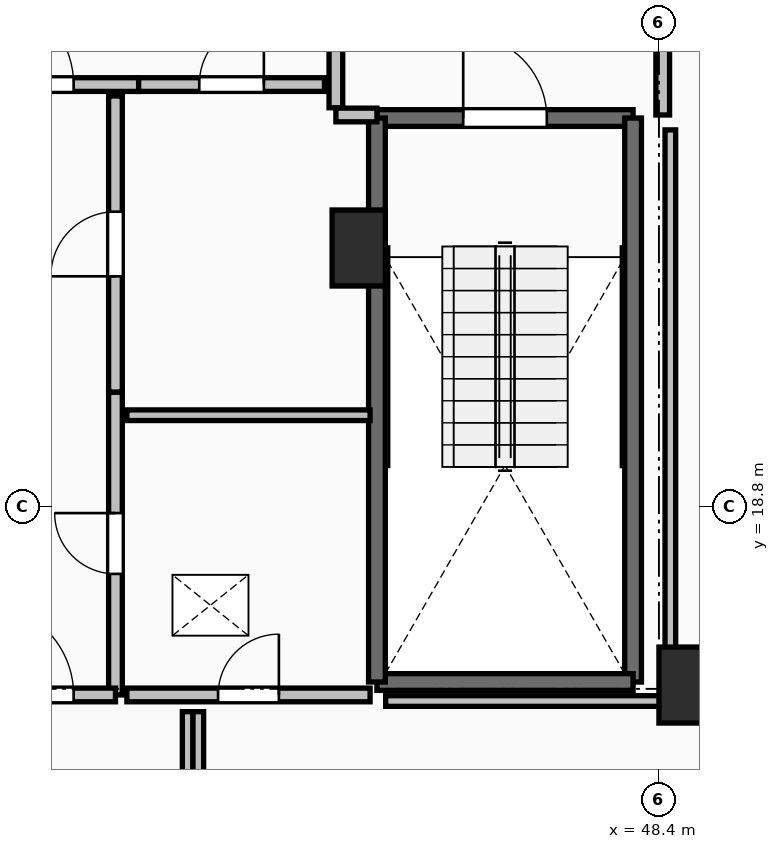
"""IFC4 building model, lengths in metres.
Left out: names, types, materials, properties, quantities, classifications, styles, units other than length and angle.
Written with IfcOpenShell. Run it as: python <this file> out.ifc"""

import sys

from ifc_helpers import new_model, si_unit, direction, frame, frame_2d, origin, origin_2d, place, context, subcontext, project, spatial, rectangle, extrude, element, fill, save


model = new_model("IFC4")
c1 = context("Model", 3, precision=1e-05, world=origin(), true_north=direction((0.0, 1.0)))
c2 = subcontext(c1, "Body", "Model", "MODEL_VIEW")
j1 = project(units=[si_unit("LENGTHUNIT", "METRE"), si_unit("PLANEANGLEUNIT", "RADIAN")], contexts=[c1])
p1 = place(None, origin())
s1 = spatial("IfcSite", under=j1, at=p1, CompositionType="ELEMENT")
p2 = place(p1, origin())
s2 = spatial("IfcBuilding", under=s1, at=p2, CompositionType="ELEMENT")
p3 = place(p2, frame((0.0, 0.0, 207.2)))
s3 = spatial("IfcBuildingStorey", under=s2, at=p3, CompositionType="ELEMENT", Elevation=207.2)
for number, where, z_axis, x_axis in (
    (1, (48.75, 16.45, 0.0), (0.0, 0.0, 1.0), (1.0, 0.0, 0.0)),
    (2, (44.45, 22.2, 0.0), (0.0, 0.0, 1.0), (1.0, 0.0, 0.0)),
):
    element("IfcColumn", number, at=place(p3, frame(where, z_axis=z_axis, x_axis=x_axis)), inside=s3, PredefinedType="PILASTER", context=c2, shape_type="SweptSolid", body=[
        extrude(rectangle(XDim=0.7, YDim=1.0, at=origin_2d()), origin(), (0.0, 0.0, 1.0), 3.55),
    ])
p4 = place(p3, frame((44.69, 23.91, 0.0), z_axis=(0.0, 0.0, 1.0), x_axis=(1.0, 0.0, 0.0)))
e3 = element("IfcWall", 3, at=p4, inside=s3, PredefinedType="SOLIDWALL", context=c2, shape_type="SweptSolid", body=[
    extrude(rectangle(XDim=3.37, YDim=0.22, at=frame_2d((1.685, 0.0))), origin(), (0.0, 0.0, 1.0), 3.29),
])
p5 = place(p4, frame((1.135, 0.0, 0.0)))
e4 = element("IfcOpeningElement", 4, at=p5, cuts=e3, PredefinedType="OPENING", context=c2, shape_type="SweptSolid", body=[
    extrude(rectangle(XDim=1.1, YDim=2.15, at=frame_2d((0.55, 1.075))), frame((0.0, 0.125, 0.0), z_axis=(0.0, -1.0, 0.0), x_axis=(1.0, 0.0, 0.0)), (0.0, 0.0, 1.0), 0.25),
])
p6 = place(p3, frame((48.06, 23.91, 0.0), z_axis=(0.0, 0.0, 1.0), x_axis=(0.0, -1.0, 0.0)))
e5 = element("IfcWall", 5, at=p6, inside=s3, PredefinedType="SOLIDWALL", context=c2, shape_type="SweptSolid", body=[
    extrude(rectangle(XDim=7.42, YDim=0.22, at=frame_2d((3.71, 0.0))), origin(), (0.0, 0.0, 1.0), 3.29),
])
p7 = place(p3, frame((48.06, 16.49, 0.0), z_axis=(0.0, 0.0, 1.0), x_axis=(-1.0, 0.0, 0.0)))
e6 = element("IfcWall", 6, at=p7, inside=s3, PredefinedType="SOLIDWALL", context=c2, shape_type="SweptSolid", body=[
    extrude(rectangle(XDim=3.37, YDim=0.22, at=frame_2d((1.685, 0.0))), origin(), (0.0, 0.0, 1.0), 3.29),
])
p8 = place(p3, frame((44.69, 16.49, 0.0), z_axis=(0.0, 0.0, 1.0), x_axis=(0.0, 1.0, 0.0)))
e7 = element("IfcWall", 7, at=p8, inside=s3, PredefinedType="SOLIDWALL", context=c2, shape_type="SweptSolid", body=[
    extrude(rectangle(XDim=7.42, YDim=0.22, at=frame_2d((3.71, 0.0))), origin(), (0.0, 0.0, 1.0), 3.29),
])
p9 = place(p3, frame((44.15, 27.955, 0.0), z_axis=(0.0, 0.0, 1.0), x_axis=(0.0, -1.0, 0.0)))
e8 = element("IfcWall", 8, at=p9, inside=s3, PredefinedType="PARTITIONING", context=c2, shape_type="SweptSolid", body=[
    extrude(rectangle(XDim=3.91, YDim=0.18, at=frame_2d((1.955, 0.0))), origin(), (0.0, 0.0, 1.0), 3.29),
])
p10 = place(p9, frame((1.355, 0.0, 0.0)))
e9 = element("IfcOpeningElement", 9, at=p10, cuts=e8, PredefinedType="OPENING", context=c2, shape_type="SweptSolid", body=[
    extrude(rectangle(XDim=1.2, YDim=2.15, at=frame_2d((0.6, 1.075))), frame((0.0, 0.105, 0.0), z_axis=(0.0, -1.0, 0.0), x_axis=(1.0, 0.0, 0.0)), (0.0, 0.0, 1.0), 0.21),
])
p11 = place(p3, frame((44.15, 23.95, 0.0), z_axis=(0.0, 0.0, 1.0), x_axis=(1.0, 0.0, 0.0)))
e10 = element("IfcWall", 10, at=p11, inside=s3, PredefinedType="PARTITIONING", context=c2, shape_type="SweptSolid", body=[
    extrude(rectangle(XDim=0.54, YDim=0.18, at=frame_2d((0.27, 0.0))), origin(), (0.0, 0.0, 1.0), 3.29),
])
p12 = place(p3, frame((48.45, 23.95, 0.0), z_axis=(0.0, 0.0, 1.0), x_axis=(0.0, 1.0, 0.0)))
e11 = element("IfcWall", 11, at=p12, inside=s3, PredefinedType="PARTITIONING", context=c2, shape_type="SweptSolid", body=[
    extrude(rectangle(XDim=4.05, YDim=0.18, at=frame_2d((2.025, 0.0))), origin(), (0.0, 0.0, 1.0), 3.29),
])
p13 = place(p12, frame((1.425, 0.0, 0.0)))
e12 = element("IfcOpeningElement", 12, at=p13, cuts=e11, PredefinedType="OPENING", context=c2, shape_type="SweptSolid", body=[
    extrude(rectangle(XDim=1.2, YDim=2.15, at=frame_2d((0.6, 1.075))), frame((0.0, 0.105, 0.0), z_axis=(0.0, -1.0, 0.0), x_axis=(1.0, 0.0, 0.0)), (0.0, 0.0, 1.0), 0.21),
])
p14 = place(p3, frame((38.645, 24.35, 0.0), z_axis=(0.0, 0.0, 1.0), x_axis=(1.0, 0.0, 0.0)))
e13 = element("IfcWall", 13, at=p14, inside=s3, PredefinedType="PARTITIONING", context=c2, shape_type="SweptSolid", body=[
    extrude(rectangle(XDim=2.91, YDim=0.18, at=frame_2d((1.455, 0.0))), origin(), (0.0, 0.0, 1.0), 3.29),
])
p15 = place(p14, frame((0.855, 0.0, 0.0)))
e14 = element("IfcOpeningElement", 14, at=p15, cuts=e13, PredefinedType="OPENING", context=c2, shape_type="SweptSolid", body=[
    extrude(rectangle(XDim=1.2, YDim=2.15, at=frame_2d((0.6, 1.075))), frame((0.0, 0.105, 0.0), z_axis=(0.0, -1.0, 0.0), x_axis=(1.0, 0.0, 0.0)), (0.0, 0.0, 1.0), 0.21),
])
p16 = place(p3, frame((41.555, 24.35, 0.0), z_axis=(0.0, 0.0, 1.0), x_axis=(1.0, 0.0, 0.0)))
e15 = element("IfcWall", 15, at=p16, inside=s3, PredefinedType="PARTITIONING", context=c2, shape_type="SweptSolid", body=[
    extrude(rectangle(XDim=2.445, YDim=0.18, at=frame_2d((1.223, 0.0))), origin(), (0.0, 0.0, 1.0), 3.29),
])
p17 = place(p16, frame((0.798, 0.0, 0.0)))
e16 = element("IfcOpeningElement", 16, at=p17, cuts=e15, PredefinedType="OPENING", context=c2, shape_type="SweptSolid", body=[
    extrude(rectangle(XDim=0.85, YDim=2.1, at=frame_2d((0.425, 1.05))), frame((0.0, 0.105, 0.0), z_axis=(0.0, -1.0, 0.0), x_axis=(1.0, 0.0, 0.0)), (0.0, 0.0, 1.0), 0.21),
])
p18 = place(p3, frame((41.25, 16.32, 0.0), z_axis=(0.0, 0.0, 1.0), x_axis=(0.0, 1.0, 0.0)))
e17 = element("IfcWall", 17, at=p18, inside=s3, PredefinedType="PARTITIONING", context=c2, shape_type="SweptSolid", body=[
    extrude(rectangle(XDim=3.985, YDim=0.18, at=frame_2d((1.992, 0.0))), origin(), (0.0, 0.0, 1.0), 3.29),
])
p19 = place(p18, frame((1.593, 0.0, 0.0)))
e18 = element("IfcOpeningElement", 18, at=p19, cuts=e17, PredefinedType="OPENING", context=c2, shape_type="SweptSolid", body=[
    extrude(rectangle(XDim=0.8, YDim=2.05, at=frame_2d((0.4, 1.025))), frame((0.0, 0.105, 0.0), z_axis=(0.0, -1.0, 0.0), x_axis=(1.0, 0.0, 0.0)), (0.0, 0.0, 1.0), 0.21),
])
p20 = place(p3, frame((41.25, 20.305, 0.0), z_axis=(0.0, 0.0, 1.0), x_axis=(0.0, 1.0, 0.0)))
e19 = element("IfcWall", 19, at=p20, inside=s3, PredefinedType="PARTITIONING", context=c2, shape_type="SweptSolid", body=[
    extrude(rectangle(XDim=3.895, YDim=0.18, at=frame_2d((1.948, 0.0))), origin(), (0.0, 0.0, 1.0), 3.29),
])
p21 = place(p20, frame((1.522, 0.0, 0.0)))
e20 = element("IfcOpeningElement", 20, at=p21, cuts=e19, PredefinedType="OPENING", context=c2, shape_type="SweptSolid", body=[
    extrude(rectangle(XDim=0.85, YDim=2.1, at=frame_2d((0.425, 1.05))), frame((0.0, 0.105, 0.0), z_axis=(0.0, -1.0, 0.0), x_axis=(1.0, 0.0, 0.0)), (0.0, 0.0, 1.0), 0.21),
])
p22 = place(p3, frame((38.95, 16.32, 0.0), z_axis=(0.0, 0.0, 1.0), x_axis=(1.0, 0.0, 0.0)))
e21 = element("IfcWall", 21, at=p22, inside=s3, PredefinedType="PARTITIONING", context=c2, shape_type="SweptSolid", body=[
    extrude(rectangle(XDim=2.3, YDim=0.18, at=frame_2d((1.15, 0.0))), origin(), (0.0, 0.0, 1.0), 3.29),
])
p23 = place(p22, frame((0.55, 0.0, 0.0)))
e22 = element("IfcOpeningElement", 22, at=p23, cuts=e21, PredefinedType="OPENING", context=c2, shape_type="SweptSolid", body=[
    extrude(rectangle(XDim=1.2, YDim=2.15, at=frame_2d((0.6, 1.075))), frame((0.0, 0.105, 0.0), z_axis=(0.0, -1.0, 0.0), x_axis=(1.0, 0.0, 0.0)), (0.0, 0.0, 1.0), 0.21),
])
p24 = place(p3, frame((44.6, 20.0, 0.0), z_axis=(0.0, 0.0, 1.0), x_axis=(-1.0, 0.0, 0.0)))
e23 = element("IfcWall", 23, at=p24, inside=s3, PredefinedType="PARTITIONING", context=c2, shape_type="SweptSolid", body=[
    extrude(rectangle(XDim=3.2, YDim=0.14, at=frame_2d((1.6, 0.0))), origin(), (0.0, 0.0, 1.0), 3.29),
])
p25 = place(p3, frame((41.4, 16.32, 0.0), z_axis=(0.0, 0.0, 1.0), x_axis=(1.0, 0.0, 0.0)))
e24 = element("IfcWall", 24, at=p25, inside=s3, PredefinedType="PARTITIONING", context=c2, shape_type="SweptSolid", body=[
    extrude(rectangle(XDim=3.2, YDim=0.18, at=frame_2d((1.6, 0.0))), origin(), (0.0, 0.0, 1.0), 3.29),
])
p26 = place(p25, frame((1.2, 0.0, 0.0)))
e25 = element("IfcOpeningElement", 25, at=p26, cuts=e24, PredefinedType="OPENING", context=c2, shape_type="SweptSolid", body=[
    extrude(rectangle(XDim=0.8, YDim=2.05, at=frame_2d((0.4, 1.025))), frame((0.0, 0.105, 0.0), z_axis=(0.0, -1.0, 0.0), x_axis=(1.0, 0.0, 0.0)), (0.0, 0.0, 1.0), 0.21),
])
p27 = place(p3, frame((44.805, 16.24, 0.0), z_axis=(0.0, 0.0, 1.0), x_axis=(1.0, 0.0, 0.0)))
e26 = element("IfcWall", 26, at=p27, inside=s3, PredefinedType="PARTITIONING", context=c2, shape_type="SweptSolid", body=[
    extrude(rectangle(XDim=3.745, YDim=0.14, at=frame_2d((1.873, 0.0))), origin(), (0.0, 0.0, 1.0), 2.482),
])
p28 = place(p3, frame((48.55, 16.24, 0.0), z_axis=(0.0, 0.0, 1.0), x_axis=(0.0, 1.0, 0.0)))
e27 = element("IfcWall", 27, at=p28, inside=s3, PredefinedType="PARTITIONING", context=c2, shape_type="SweptSolid", body=[
    extrude(rectangle(XDim=7.514, YDim=0.14, at=frame_2d((3.757, 0.0))), origin(), (0.0, 0.0, 1.0), 2.482),
])
for number, where, z_axis, x_axis in (
    (28, (42.2, 16.1, 0.0), (0.0, 0.0, 1.0), (0.0, -1.0, 0.0)),
    (29, (42.34, 14.27, 0.0), (0.0, 0.0, 1.0), (0.0, 1.0, 0.0)),
):
    element("IfcWall", number, at=place(p3, frame(where, z_axis=z_axis, x_axis=x_axis)), inside=s3, PredefinedType="PARTITIONING", context=c2, shape_type="SweptSolid", body=[
        extrude(rectangle(XDim=1.83, YDim=0.14, at=frame_2d((0.915, 0.0))), origin(), (0.0, 0.0, 1.0), 3.29),
    ])
p29 = place(p5, origin())
e30 = element("IfcDoor", 30, at=p29, inside=s3, OperationType="SINGLE_SWING_LEFT", PredefinedType="DOOR", context=c2, shape_type="SweptSolid", body=[
    extrude(rectangle(XDim=1.1, YDim=2.15, at=frame_2d((0.55, 1.075))), frame((0.0, 0.025, 0.0), z_axis=(0.0, -1.0, 0.0), x_axis=(1.0, 0.0, 0.0)), (0.0, 0.0, 1.0), 0.05),
])
fill(e4, e30)
p30 = place(p15, origin())
e31 = element("IfcDoor", 31, at=p30, inside=s3, OperationType="SINGLE_SWING_LEFT", PredefinedType="DOOR", context=c2, shape_type="SweptSolid", body=[
    extrude(rectangle(XDim=1.2, YDim=2.15, at=frame_2d((0.6, 1.075))), frame((0.0, 0.025, 0.0), z_axis=(0.0, -1.0, 0.0), x_axis=(1.0, 0.0, 0.0)), (0.0, 0.0, 1.0), 0.05),
])
fill(e14, e31)
p31 = place(p17, origin())
e32 = element("IfcDoor", 32, at=p31, inside=s3, OperationType="SINGLE_SWING_RIGHT", PredefinedType="DOOR", context=c2, shape_type="SweptSolid", body=[
    extrude(rectangle(XDim=0.85, YDim=2.1, at=frame_2d((0.425, 1.05))), frame((0.0, 0.025, 0.0), z_axis=(0.0, -1.0, 0.0), x_axis=(1.0, 0.0, 0.0)), (0.0, 0.0, 1.0), 0.05),
])
fill(e16, e32)
p32 = place(p19, origin())
e33 = element("IfcDoor", 33, at=p32, inside=s3, OperationType="SINGLE_SWING_RIGHT", PredefinedType="DOOR", context=c2, shape_type="SweptSolid", body=[
    extrude(rectangle(XDim=0.8, YDim=2.05, at=frame_2d((0.4, 1.025))), frame((0.0, 0.025, 0.0), z_axis=(0.0, -1.0, 0.0), x_axis=(1.0, 0.0, 0.0)), (0.0, 0.0, 1.0), 0.05),
])
fill(e18, e33)
p33 = place(p21, origin())
e34 = element("IfcDoor", 34, at=p33, inside=s3, OperationType="SINGLE_SWING_LEFT", PredefinedType="DOOR", context=c2, shape_type="SweptSolid", body=[
    extrude(rectangle(XDim=0.85, YDim=2.1, at=frame_2d((0.425, 1.05))), frame((0.0, 0.025, 0.0), z_axis=(0.0, -1.0, 0.0), x_axis=(1.0, 0.0, 0.0)), (0.0, 0.0, 1.0), 0.05),
])
fill(e20, e34)
p34 = place(p23, origin())
e35 = element("IfcDoor", 35, at=p34, inside=s3, OperationType="SINGLE_SWING_LEFT", PredefinedType="DOOR", context=c2, shape_type="SweptSolid", body=[
    extrude(rectangle(XDim=1.2, YDim=2.15, at=frame_2d((0.6, 1.075))), frame((0.0, 0.025, 0.0), z_axis=(0.0, -1.0, 0.0), x_axis=(1.0, 0.0, 0.0)), (0.0, 0.0, 1.0), 0.05),
])
fill(e22, e35)
p35 = place(p26, origin())
e36 = element("IfcDoor", 36, at=p35, inside=s3, OperationType="SINGLE_SWING_RIGHT", PredefinedType="DOOR", context=c2, shape_type="SweptSolid", body=[
    extrude(rectangle(XDim=0.8, YDim=2.05, at=frame_2d((0.4, 1.025))), frame((0.0, 0.025, 0.0), z_axis=(0.0, -1.0, 0.0), x_axis=(1.0, 0.0, 0.0)), (0.0, 0.0, 1.0), 0.05),
])
fill(e25, e36)
save(model, sys.argv[1])
